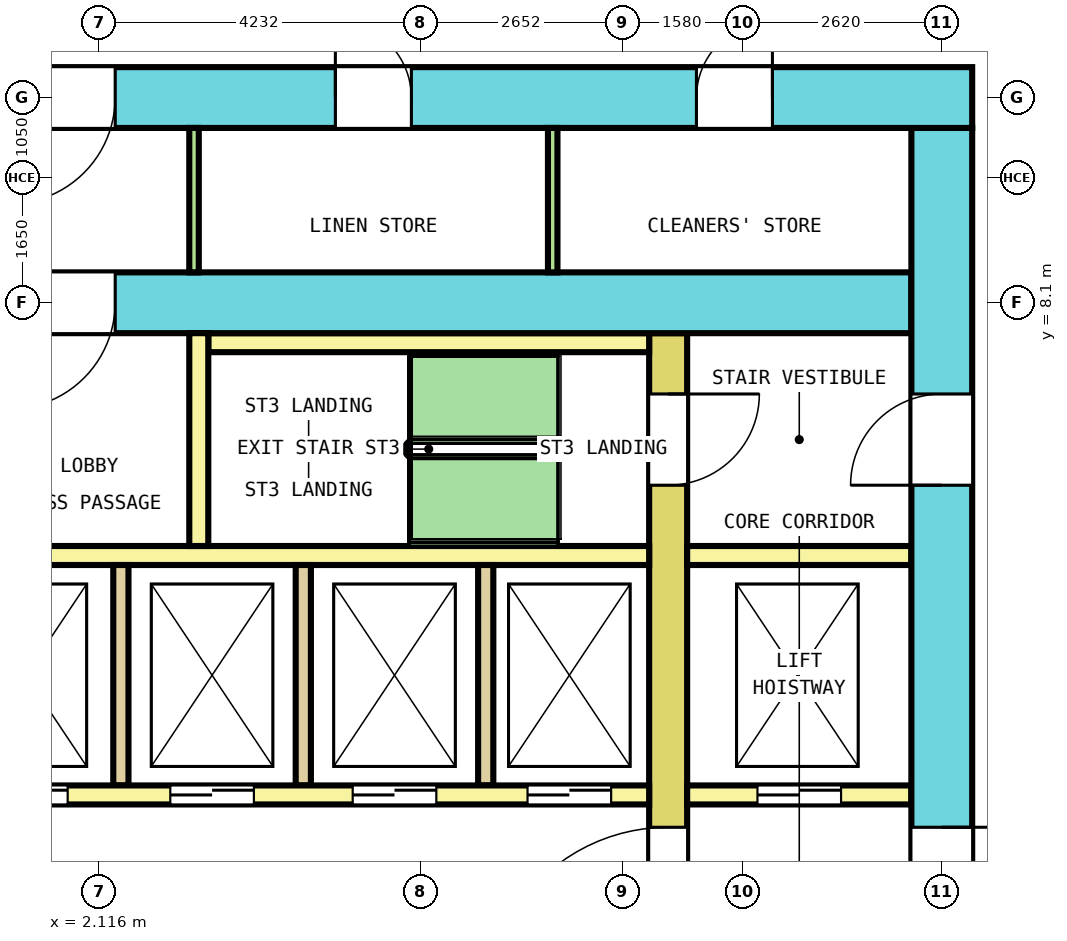
"""IFC4 building model, lengths in metres.
Left out: names, types, materials, properties, quantities, classifications, styles, units other than length and angle.
Written with IfcOpenShell. Run it as: python <this file> out.ifc"""

import sys

from ifc_helpers import new_model, si_unit, direction, frame, frame_2d, origin, place, context, subcontext, project, spatial, rectangle, extrude, element, fill, save


model = new_model("IFC4")
c1 = context("Model", 3, precision=1e-05, world=origin(), true_north=direction((0.0, 1.0)))
c2 = subcontext(c1, "Body", "Model", "MODEL_VIEW")
j1 = project(units=[si_unit("LENGTHUNIT", "METRE"), si_unit("PLANEANGLEUNIT", "RADIAN")], contexts=[c1])
p1 = place(None, origin())
s1 = spatial("IfcSite", under=j1, at=p1, CompositionType="ELEMENT")
p2 = place(p1, origin())
s2 = spatial("IfcBuilding", under=s1, at=p2, CompositionType="ELEMENT")
p3 = place(p2, frame((0.0, 0.0, 107.2)))
s3 = spatial("IfcBuildingStorey", under=s2, at=p3, CompositionType="ELEMENT", Elevation=107.2)
p4 = place(p3, frame((-13.6, 10.8, 0.0), z_axis=(0.0, 0.0, 1.0), x_axis=(1.0, 0.0, 0.0)))
e1 = element("IfcWall", 1, at=p4, inside=s3, PredefinedType="SHEAR", context=c2, shape_type="SweptSolid", body=[
    extrude(rectangle(XDim=27.2, YDim=0.8, at=frame_2d((13.6, 0.0))), origin(), (0.0, 0.0, 1.0), 5.7),
])
p5 = place(p4, frame((2.308, 0.0, 0.0)))
e2 = element("IfcOpeningElement", 2, at=p5, cuts=e1, PredefinedType="OPENING", context=c2, shape_type="SweptSolid", body=[
    extrude(rectangle(XDim=1.0, YDim=2.1, at=frame_2d((0.5, 1.05))), frame((0.0, 0.41, 0.0), z_axis=(0.0, -1.0, 0.0), x_axis=(1.0, 0.0, 0.0)), (0.0, 0.0, 1.0), 0.82),
])
p6 = place(p4, frame((6.419, 0.0, 0.0)))
e3 = element("IfcOpeningElement", 3, at=p6, cuts=e1, PredefinedType="OPENING", context=c2, shape_type="SweptSolid", body=[
    extrude(rectangle(XDim=1.0, YDim=2.1, at=frame_2d((0.5, 1.05))), frame((0.0, 0.41, 0.0), z_axis=(0.0, -1.0, 0.0), x_axis=(1.0, 0.0, 0.0)), (0.0, 0.0, 1.0), 0.82),
])
p7 = place(p4, frame((10.498, 0.0, 0.0)))
e4 = element("IfcOpeningElement", 4, at=p7, cuts=e1, PredefinedType="OPENING", context=c2, shape_type="SweptSolid", body=[
    extrude(rectangle(XDim=1.0, YDim=2.1, at=frame_2d((0.5, 1.05))), frame((0.0, 0.41, 0.0), z_axis=(0.0, -1.0, 0.0), x_axis=(1.0, 0.0, 0.0)), (0.0, 0.0, 1.0), 0.82),
])
p8 = place(p4, frame((18.822, 0.0, 0.0)))
e5 = element("IfcOpeningElement", 5, at=p8, cuts=e1, PredefinedType="OPENING", context=c2, shape_type="SweptSolid", body=[
    extrude(rectangle(XDim=1.0, YDim=2.1, at=frame_2d((0.5, 1.05))), frame((0.0, 0.41, 0.0), z_axis=(0.0, -1.0, 0.0), x_axis=(1.0, 0.0, 0.0)), (0.0, 0.0, 1.0), 0.82),
])
p9 = place(p4, frame((23.572, 0.0, 0.0)))
e6 = element("IfcOpeningElement", 6, at=p9, cuts=e1, PredefinedType="OPENING", context=c2, shape_type="SweptSolid", body=[
    extrude(rectangle(XDim=1.0, YDim=2.1, at=frame_2d((0.5, 1.05))), frame((0.0, 0.41, 0.0), z_axis=(0.0, -1.0, 0.0), x_axis=(1.0, 0.0, 0.0)), (0.0, 0.0, 1.0), 0.82),
])
p10 = place(p4, frame((14.525, 0.0, 0.0)))
e7 = element("IfcOpeningElement", 7, at=p10, cuts=e1, PredefinedType="OPENING", context=c2, shape_type="SweptSolid", body=[
    extrude(rectangle(XDim=1.4, YDim=2.1, at=frame_2d((0.7, 1.05))), frame((0.0, 0.41, 0.0), z_axis=(0.0, -1.0, 0.0), x_axis=(1.0, 0.0, 0.0)), (0.0, 0.0, 1.0), 0.82),
])
p11 = place(p3, frame((13.2, -10.4, 0.0), z_axis=(0.0, 0.0, 1.0), x_axis=(0.0, 1.0, 0.0)))
e8 = element("IfcWall", 8, at=p11, inside=s3, PredefinedType="SHEAR", context=c2, shape_type="SweptSolid", body=[
    extrude(rectangle(XDim=20.8, YDim=0.8, at=frame_2d((10.4, 0.0))), origin(), (0.0, 0.0, 1.0), 5.7),
])
p12 = place(p11, frame((9.2, 0.0, 0.0)))
e9 = element("IfcOpeningElement", 9, at=p12, cuts=e8, PredefinedType="OPENING", context=c2, shape_type="SweptSolid", body=[
    extrude(rectangle(XDim=2.4, YDim=2.1, at=frame_2d((1.2, 1.05))), frame((0.0, 0.41, 0.0), z_axis=(0.0, -1.0, 0.0), x_axis=(1.0, 0.0, 0.0)), (0.0, 0.0, 1.0), 0.82),
])
p13 = place(p11, frame((16.1, 0.0, 0.0)))
e10 = element("IfcOpeningElement", 10, at=p13, cuts=e8, PredefinedType="OPENING", context=c2, shape_type="SweptSolid", body=[
    extrude(rectangle(XDim=1.2, YDim=2.1, at=frame_2d((0.6, 1.05))), frame((0.0, 0.41, 0.0), z_axis=(0.0, -1.0, 0.0), x_axis=(1.0, 0.0, 0.0)), (0.0, 0.0, 1.0), 0.82),
])
p14 = place(p11, frame((2.869, 0.0, 0.0)))
e11 = element("IfcOpeningElement", 11, at=p14, cuts=e8, PredefinedType="OPENING", context=c2, shape_type="SweptSolid", body=[
    extrude(rectangle(XDim=1.0, YDim=2.1, at=frame_2d((0.5, 1.05))), frame((0.0, 0.41, 0.0), z_axis=(0.0, -1.0, 0.0), x_axis=(1.0, 0.0, 0.0)), (0.0, 0.0, 1.0), 0.82),
])
p15 = place(p11, frame((4.331, 0.0, 0.0)))
e12 = element("IfcOpeningElement", 12, at=p15, cuts=e8, PredefinedType="OPENING", context=c2, shape_type="SweptSolid", body=[
    extrude(rectangle(XDim=1.0, YDim=2.1, at=frame_2d((0.5, 1.05))), frame((0.0, 0.41, 0.0), z_axis=(0.0, -1.0, 0.0), x_axis=(1.0, 0.0, 0.0)), (0.0, 0.0, 1.0), 0.82),
])
p16 = place(p3, frame((-12.8, 8.1, 0.0), z_axis=(0.0, 0.0, 1.0), x_axis=(1.0, 0.0, 0.0)))
e13 = element("IfcWall", 13, at=p16, inside=s3, PredefinedType="SHEAR", context=c2, shape_type="SweptSolid", body=[
    extrude(rectangle(XDim=25.6, YDim=0.8, at=frame_2d((12.8, 0.0))), origin(), (0.0, 0.0, 1.0), 5.7),
])
p17 = place(p16, frame((13.725, 0.0, 0.0)))
e14 = element("IfcOpeningElement", 14, at=p17, cuts=e13, PredefinedType="OPENING", context=c2, shape_type="SweptSolid", body=[
    extrude(rectangle(XDim=1.4, YDim=2.1, at=frame_2d((0.7, 1.05))), frame((0.0, 0.41, 0.0), z_axis=(0.0, -1.0, 0.0), x_axis=(1.0, 0.0, 0.0)), (0.0, 0.0, 1.0), 0.82),
])
p18 = place(p3, frame((9.6, -7.7, 0.0), z_axis=(0.0, 0.0, 1.0), x_axis=(0.0, 1.0, 0.0)))
e15 = element("IfcWall", 15, at=p18, inside=s3, PredefinedType="SHEAR", context=c2, shape_type="SweptSolid", body=[
    extrude(rectangle(XDim=15.4, YDim=0.5, at=frame_2d((7.7, 0.0))), origin(), (0.0, 0.0, 1.0), 5.7),
])
p19 = place(p18, frame((6.5, 0.0, 0.0)))
e16 = element("IfcOpeningElement", 16, at=p19, cuts=e15, PredefinedType="OPENING", context=c2, shape_type="SweptSolid", body=[
    extrude(rectangle(XDim=2.4, YDim=2.1, at=frame_2d((1.2, 1.05))), frame((0.0, 0.26, 0.0), z_axis=(0.0, -1.0, 0.0), x_axis=(1.0, 0.0, 0.0)), (0.0, 0.0, 1.0), 0.52),
])
p20 = place(p18, frame((13.4, 0.0, 0.0)))
e17 = element("IfcOpeningElement", 17, at=p20, cuts=e15, PredefinedType="OPENING", context=c2, shape_type="SweptSolid", body=[
    extrude(rectangle(XDim=1.2, YDim=2.1, at=frame_2d((0.6, 1.05))), frame((0.0, 0.26, 0.0), z_axis=(0.0, -1.0, 0.0), x_axis=(1.0, 0.0, 0.0)), (0.0, 0.0, 1.0), 0.52),
])
p21 = place(p18, frame((0.9, 0.0, 0.0)))
e18 = element("IfcOpeningElement", 18, at=p21, cuts=e15, PredefinedType="OPENING", context=c2, shape_type="SweptSolid", body=[
    extrude(rectangle(XDim=1.0, YDim=2.1, at=frame_2d((0.5, 1.05))), frame((0.0, 0.26, 0.0), z_axis=(0.0, -1.0, 0.0), x_axis=(1.0, 0.0, 0.0)), (0.0, 0.0, 1.0), 0.52),
])
p22 = place(p3, frame((-9.35, 1.625, 0.0), z_axis=(0.0, 0.0, 1.0), x_axis=(1.0, 0.0, 0.0)))
e19 = element("IfcWall", 19, at=p22, inside=s3, PredefinedType="SOLIDWALL", context=c2, shape_type="SweptSolid", body=[
    extrude(rectangle(XDim=18.7, YDim=0.25, at=frame_2d((9.35, 0.0))), origin(), (0.0, 0.0, 1.0), 5.7),
])
p23 = place(p22, frame((0.5, 0.0, 0.0)))
e20 = element("IfcOpeningElement", 20, at=p23, cuts=e19, PredefinedType="OPENING", context=c2, shape_type="SweptSolid", body=[
    extrude(rectangle(XDim=1.1, YDim=2.1, at=frame_2d((0.55, 1.05))), frame((0.0, 0.135, 0.0), z_axis=(0.0, -1.0, 0.0), x_axis=(1.0, 0.0, 0.0)), (0.0, 0.0, 1.0), 0.27),
])
p24 = place(p22, frame((2.85, 0.0, 0.0)))
e21 = element("IfcOpeningElement", 21, at=p24, cuts=e19, PredefinedType="OPENING", context=c2, shape_type="SweptSolid", body=[
    extrude(rectangle(XDim=1.1, YDim=2.1, at=frame_2d((0.55, 1.05))), frame((0.0, 0.135, 0.0), z_axis=(0.0, -1.0, 0.0), x_axis=(1.0, 0.0, 0.0)), (0.0, 0.0, 1.0), 0.27),
])
p25 = place(p22, frame((5.15, 0.0, 0.0)))
e22 = element("IfcOpeningElement", 22, at=p25, cuts=e19, PredefinedType="OPENING", context=c2, shape_type="SweptSolid", body=[
    extrude(rectangle(XDim=1.1, YDim=2.1, at=frame_2d((0.55, 1.05))), frame((0.0, 0.135, 0.0), z_axis=(0.0, -1.0, 0.0), x_axis=(1.0, 0.0, 0.0)), (0.0, 0.0, 1.0), 0.27),
])
p26 = place(p22, frame((7.65, 0.0, 0.0)))
e23 = element("IfcOpeningElement", 23, at=p26, cuts=e19, PredefinedType="OPENING", context=c2, shape_type="SweptSolid", body=[
    extrude(rectangle(XDim=1.1, YDim=2.1, at=frame_2d((0.55, 1.05))), frame((0.0, 0.135, 0.0), z_axis=(0.0, -1.0, 0.0), x_axis=(1.0, 0.0, 0.0)), (0.0, 0.0, 1.0), 0.27),
])
p27 = place(p22, frame((9.95, 0.0, 0.0)))
e24 = element("IfcOpeningElement", 24, at=p27, cuts=e19, PredefinedType="OPENING", context=c2, shape_type="SweptSolid", body=[
    extrude(rectangle(XDim=1.1, YDim=2.1, at=frame_2d((0.55, 1.05))), frame((0.0, 0.135, 0.0), z_axis=(0.0, -1.0, 0.0), x_axis=(1.0, 0.0, 0.0)), (0.0, 0.0, 1.0), 0.27),
])
p28 = place(p22, frame((12.4, 0.0, 0.0)))
e25 = element("IfcOpeningElement", 25, at=p28, cuts=e19, PredefinedType="OPENING", context=c2, shape_type="SweptSolid", body=[
    extrude(rectangle(XDim=1.1, YDim=2.1, at=frame_2d((0.55, 1.05))), frame((0.0, 0.135, 0.0), z_axis=(0.0, -1.0, 0.0), x_axis=(1.0, 0.0, 0.0)), (0.0, 0.0, 1.0), 0.27),
])
p29 = place(p22, frame((14.8, 0.0, 0.0)))
e26 = element("IfcOpeningElement", 26, at=p29, cuts=e19, PredefinedType="OPENING", context=c2, shape_type="SweptSolid", body=[
    extrude(rectangle(XDim=1.1, YDim=2.1, at=frame_2d((0.55, 1.05))), frame((0.0, 0.135, 0.0), z_axis=(0.0, -1.0, 0.0), x_axis=(1.0, 0.0, 0.0)), (0.0, 0.0, 1.0), 0.27),
])
p30 = place(p22, frame((17.1, 0.0, 0.0)))
e27 = element("IfcOpeningElement", 27, at=p30, cuts=e19, PredefinedType="OPENING", context=c2, shape_type="SweptSolid", body=[
    extrude(rectangle(XDim=1.1, YDim=2.1, at=frame_2d((0.55, 1.05))), frame((0.0, 0.135, 0.0), z_axis=(0.0, -1.0, 0.0), x_axis=(1.0, 0.0, 0.0)), (0.0, 0.0, 1.0), 0.27),
])
p31 = place(p3, frame((9.85, 1.625, 0.0), z_axis=(0.0, 0.0, 1.0), x_axis=(1.0, 0.0, 0.0)))
e28 = element("IfcWall", 28, at=p31, inside=s3, PredefinedType="SOLIDWALL", context=c2, shape_type="SweptSolid", body=[
    extrude(rectangle(XDim=2.95, YDim=0.25, at=frame_2d((1.475, 0.0))), origin(), (0.0, 0.0, 1.0), 5.7),
])
p32 = place(p31, frame((0.925, 0.0, 0.0)))
e29 = element("IfcOpeningElement", 29, at=p32, cuts=e28, PredefinedType="OPENING", context=c2, shape_type="SweptSolid", body=[
    extrude(rectangle(XDim=1.1, YDim=2.1, at=frame_2d((0.55, 1.05))), frame((0.0, 0.135, 0.0), z_axis=(0.0, -1.0, 0.0), x_axis=(1.0, 0.0, 0.0)), (0.0, 0.0, 1.0), 0.27),
])
p33 = place(p3, frame((-9.35, 4.775, 0.0), z_axis=(0.0, 0.0, 1.0), x_axis=(1.0, 0.0, 0.0)))
e30 = element("IfcWall", 30, at=p33, inside=s3, PredefinedType="SOLIDWALL", context=c2, shape_type="SweptSolid", body=[
    extrude(rectangle(XDim=18.7, YDim=0.25, at=frame_2d((9.35, 0.0))), origin(), (0.0, 0.0, 1.0), 5.7),
])
p34 = place(p3, frame((9.85, 4.775, 0.0), z_axis=(0.0, 0.0, 1.0), x_axis=(1.0, 0.0, 0.0)))
e31 = element("IfcWall", 31, at=p34, inside=s3, PredefinedType="SOLIDWALL", context=c2, shape_type="SweptSolid", body=[
    extrude(rectangle(XDim=2.95, YDim=0.25, at=frame_2d((1.475, 0.0))), origin(), (0.0, 0.0, 1.0), 5.7),
])
for number, where, z_axis, x_axis in (
    (32, (2.4, 1.75, 0.0), (0.0, 0.0, 1.0), (0.0, 1.0, 0.0)),
    (33, (4.8, 1.75, 0.0), (0.0, 0.0, 1.0), (0.0, 1.0, 0.0)),
    (34, (7.2, 1.75, 0.0), (0.0, 0.0, 1.0), (0.0, 1.0, 0.0)),
):
    element("IfcWall", number, at=place(p3, frame(where, z_axis=z_axis, x_axis=x_axis)), inside=s3, PredefinedType="SOLIDWALL", context=c2, shape_type="SweptSolid", body=[
        extrude(rectangle(XDim=2.9, YDim=0.2, at=frame_2d((1.45, 0.0))), origin(), (0.0, 0.0, 1.0), 5.7),
    ])
p35 = place(p3, frame((3.55, 7.575, 0.0), z_axis=(0.0, 0.0, 1.0), x_axis=(1.0, 0.0, 0.0)))
e35 = element("IfcWall", 35, at=p35, inside=s3, PredefinedType="SOLIDWALL", context=c2, shape_type="SweptSolid", body=[
    extrude(rectangle(XDim=5.8, YDim=0.25, at=frame_2d((2.9, 0.0))), origin(), (0.0, 0.0, 1.0), 5.7),
])
p36 = place(p3, frame((3.425, 4.9, 0.0), z_axis=(0.0, 0.0, 1.0), x_axis=(0.0, 1.0, 0.0)))
e36 = element("IfcWall", 36, at=p36, inside=s3, PredefinedType="SOLIDWALL", context=c2, shape_type="SweptSolid", body=[
    extrude(rectangle(XDim=2.8, YDim=0.25, at=frame_2d((1.4, 0.0))), origin(), (0.0, 0.0, 1.0), 5.7),
])
for number, where, z_axis, x_axis in (
    (37, (3.363, 8.5, 0.0), (0.0, 0.0, 1.0), (0.0, 1.0, 0.0)),
    (38, (8.081, 8.5, 0.0), (0.0, 0.0, 1.0), (0.0, 1.0, 0.0)),
):
    element("IfcWall", number, at=place(p3, frame(where, z_axis=z_axis, x_axis=x_axis)), inside=s3, PredefinedType="PARTITIONING", context=c2, shape_type="SweptSolid", body=[
        extrude(rectangle(XDim=1.9, YDim=0.125, at=frame_2d((0.95, 0.0))), origin(), (0.0, 0.0, 1.0), 5.7),
    ])
p37 = place(p27, origin())
e39 = element("IfcDoor", 39, at=p37, inside=s3, OperationType="DOUBLE_DOOR_SLIDING", PredefinedType="DOOR", context=c2, shape_type="SweptSolid", body=[
    extrude(rectangle(XDim=1.1, YDim=2.1, at=frame_2d((0.55, 1.05))), frame((0.0, 0.075, 0.0), z_axis=(0.0, -1.0, 0.0), x_axis=(1.0, 0.0, 0.0)), (0.0, 0.0, 1.0), 0.15),
])
fill(e24, e39)
p38 = place(p28, origin())
e40 = element("IfcDoor", 40, at=p38, inside=s3, OperationType="DOUBLE_DOOR_SLIDING", PredefinedType="DOOR", context=c2, shape_type="SweptSolid", body=[
    extrude(rectangle(XDim=1.1, YDim=2.1, at=frame_2d((0.55, 1.05))), frame((0.0, 0.075, 0.0), z_axis=(0.0, -1.0, 0.0), x_axis=(1.0, 0.0, 0.0)), (0.0, 0.0, 1.0), 0.15),
])
fill(e25, e40)
p39 = place(p29, origin())
e41 = element("IfcDoor", 41, at=p39, inside=s3, OperationType="DOUBLE_DOOR_SLIDING", PredefinedType="DOOR", context=c2, shape_type="SweptSolid", body=[
    extrude(rectangle(XDim=1.1, YDim=2.1, at=frame_2d((0.55, 1.05))), frame((0.0, 0.075, 0.0), z_axis=(0.0, -1.0, 0.0), x_axis=(1.0, 0.0, 0.0)), (0.0, 0.0, 1.0), 0.15),
])
fill(e26, e41)
p40 = place(p30, origin())
e42 = element("IfcDoor", 42, at=p40, inside=s3, OperationType="DOUBLE_DOOR_SLIDING", PredefinedType="DOOR", context=c2, shape_type="SweptSolid", body=[
    extrude(rectangle(XDim=1.1, YDim=2.1, at=frame_2d((0.55, 1.05))), frame((0.0, 0.075, 0.0), z_axis=(0.0, -1.0, 0.0), x_axis=(1.0, 0.0, 0.0)), (0.0, 0.0, 1.0), 0.15),
])
fill(e27, e42)
p41 = place(p32, origin())
e43 = element("IfcDoor", 43, at=p41, inside=s3, OperationType="DOUBLE_DOOR_SLIDING", PredefinedType="DOOR", context=c2, shape_type="SweptSolid", body=[
    extrude(rectangle(XDim=1.1, YDim=2.1, at=frame_2d((0.55, 1.05))), frame((0.0, 0.075, 0.0), z_axis=(0.0, -1.0, 0.0), x_axis=(1.0, 0.0, 0.0)), (0.0, 0.0, 1.0), 0.15),
])
fill(e29, e43)
p42 = place(p19, origin())
e44 = element("IfcDoor", 44, at=p42, inside=s3, OperationType="DOUBLE_DOOR_SINGLE_SWING", PredefinedType="DOOR", context=c2, shape_type="SweptSolid", body=[
    extrude(rectangle(XDim=2.4, YDim=2.1, at=frame_2d((1.2, 1.05))), frame((0.0, 0.2, 0.0), z_axis=(0.0, -1.0, 0.0), x_axis=(1.0, 0.0, 0.0)), (0.0, 0.0, 1.0), 0.4),
])
fill(e16, e44)
p43 = place(p12, origin())
e45 = element("IfcDoor", 45, at=p43, inside=s3, OperationType="DOUBLE_DOOR_SINGLE_SWING", PredefinedType="DOOR", context=c2, shape_type="SweptSolid", body=[
    extrude(rectangle(XDim=2.4, YDim=2.1, at=frame_2d((1.2, 1.05))), frame((0.0, 0.3, 0.0), z_axis=(0.0, -1.0, 0.0), x_axis=(1.0, 0.0, 0.0)), (0.0, 0.0, 1.0), 0.6),
])
fill(e9, e45)
p44 = place(p20, origin())
e46 = element("IfcDoor", 46, at=p44, inside=s3, OperationType="SINGLE_SWING_RIGHT", PredefinedType="DOOR", context=c2, shape_type="SweptSolid", body=[
    extrude(rectangle(XDim=1.2, YDim=2.1, at=frame_2d((0.6, 1.05))), frame((0.0, 0.2, 0.0), z_axis=(0.0, -1.0, 0.0), x_axis=(1.0, 0.0, 0.0)), (0.0, 0.0, 1.0), 0.4),
])
fill(e17, e46)
p45 = place(p13, origin())
e47 = element("IfcDoor", 47, at=p45, inside=s3, OperationType="SINGLE_SWING_LEFT", PredefinedType="DOOR", context=c2, shape_type="SweptSolid", body=[
    extrude(rectangle(XDim=1.2, YDim=2.1, at=frame_2d((0.6, 1.05))), frame((0.0, 0.3, 0.0), z_axis=(0.0, -1.0, 0.0), x_axis=(1.0, 0.0, 0.0)), (0.0, 0.0, 1.0), 0.6),
])
fill(e10, e47)
p46 = place(p17, origin())
e48 = element("IfcDoor", 48, at=p46, inside=s3, OperationType="DOUBLE_DOOR_SINGLE_SWING", PredefinedType="DOOR", context=c2, shape_type="SweptSolid", body=[
    extrude(rectangle(XDim=1.4, YDim=2.1, at=frame_2d((0.7, 1.05))), frame((0.0, 0.3, 0.0), z_axis=(0.0, -1.0, 0.0), x_axis=(1.0, 0.0, 0.0)), (0.0, 0.0, 1.0), 0.6),
])
fill(e14, e48)
p47 = place(p8, origin())
e49 = element("IfcDoor", 49, at=p47, inside=s3, OperationType="SINGLE_SWING_RIGHT", PredefinedType="DOOR", context=c2, shape_type="SweptSolid", body=[
    extrude(rectangle(XDim=1.0, YDim=2.1, at=frame_2d((0.5, 1.05))), frame((0.0, 0.3, 0.0), z_axis=(0.0, -1.0, 0.0), x_axis=(1.0, 0.0, 0.0)), (0.0, 0.0, 1.0), 0.6),
])
fill(e5, e49)
p48 = place(p9, origin())
e50 = element("IfcDoor", 50, at=p48, inside=s3, OperationType="SINGLE_SWING_LEFT", PredefinedType="DOOR", context=c2, shape_type="SweptSolid", body=[
    extrude(rectangle(XDim=1.0, YDim=2.1, at=frame_2d((0.5, 1.05))), frame((0.0, 0.3, 0.0), z_axis=(0.0, -1.0, 0.0), x_axis=(1.0, 0.0, 0.0)), (0.0, 0.0, 1.0), 0.6),
])
fill(e6, e50)
p49 = place(p10, origin())
e51 = element("IfcDoor", 51, at=p49, inside=s3, OperationType="DOUBLE_DOOR_SINGLE_SWING", PredefinedType="DOOR", context=c2, shape_type="SweptSolid", body=[
    extrude(rectangle(XDim=1.4, YDim=2.1, at=frame_2d((0.7, 1.05))), frame((0.0, 0.3, 0.0), z_axis=(0.0, -1.0, 0.0), x_axis=(1.0, 0.0, 0.0)), (0.0, 0.0, 1.0), 0.6),
])
fill(e7, e51)
save(model, sys.argv[1])
